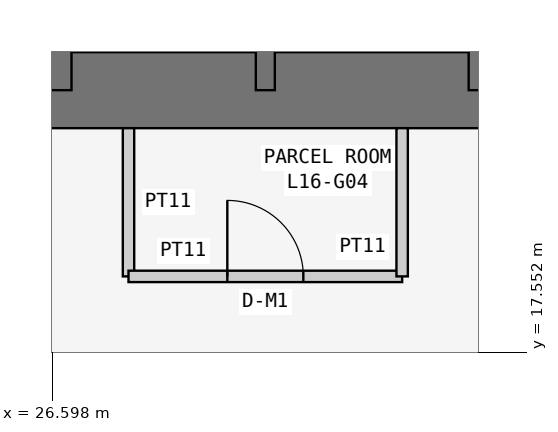
"""IFC4 building model, lengths in metres.
Left out: names, types, materials, properties, quantities, classifications, styles, units other than length and angle.
Written with IfcOpenShell. Run it as: python <this file> out.ifc"""

import sys

from ifc_helpers import new_model, si_unit, direction, frame, frame_2d, origin, place, context, subcontext, project, spatial, rectangle, extrude, element, fill, save


model = new_model("IFC4")
c1 = context("Model", 3, precision=1e-05, world=origin(), true_north=direction((0.0, 1.0)))
c2 = subcontext(c1, "Body", "Model", "MODEL_VIEW")
j1 = project(units=[si_unit("LENGTHUNIT", "METRE"), si_unit("PLANEANGLEUNIT", "RADIAN")], contexts=[c1])
p1 = place(None, origin())
s1 = spatial("IfcSite", under=j1, at=p1, CompositionType="ELEMENT")
p2 = place(p1, origin())
s2 = spatial("IfcBuilding", under=s1, at=p2, CompositionType="ELEMENT")
p3 = place(p2, frame((0.0, 0.0, 66.9)))
s3 = spatial("IfcBuildingStorey", under=s2, at=p3, CompositionType="ELEMENT", Elevation=66.9)
p4 = place(p3, frame((21.0, 21.0, 0.0), z_axis=(0.0, 0.0, 1.0), x_axis=(1.0, 0.0, 0.0)))
e1 = element("IfcWall", 1, at=p4, inside=s3, PredefinedType="SHEAR", context=c2, shape_type="SweptSolid", body=[
    extrude(rectangle(XDim=17.3, YDim=1.0, at=frame_2d((8.65, 0.0))), origin(), (0.0, 0.0, 1.0), 3.6),
])
p5 = place(p3, frame((26.6, 21.0, 0.0), z_axis=(0.0, 0.0, 1.0), x_axis=(0.0, 1.0, 0.0)))
e2 = element("IfcWall", 2, at=p5, inside=s3, PredefinedType="SHEAR", context=c2, shape_type="SweptSolid", body=[
    extrude(rectangle(XDim=16.8, YDim=0.5, at=frame_2d((8.4, 0.0))), origin(), (0.0, 0.0, 1.0), 3.6),
])
p6 = place(p5, frame((10.4, 0.0, 0.0)))
e3 = element("IfcOpeningElement", 3, at=p6, cuts=e2, PredefinedType="OPENING", context=c2, shape_type="SweptSolid", body=[
    extrude(rectangle(XDim=1.2, YDim=2.1, at=frame_2d((0.6, 1.05))), frame((0.0, 0.26, 0.0), z_axis=(0.0, -1.0, 0.0), x_axis=(1.0, 0.0, 0.0)), (0.0, 0.0, 1.0), 0.52),
])
for number, where, z_axis, x_axis in (
    (4, (29.4, 21.0, 0.0), (0.0, 0.0, 1.0), (0.0, 1.0, 0.0)),
    (5, (32.2, 21.0, 0.0), (0.0, 0.0, 1.0), (0.0, 1.0, 0.0)),
):
    element("IfcWall", number, at=place(p3, frame(where, z_axis=z_axis, x_axis=x_axis)), inside=s3, PredefinedType="SHEAR", context=c2, shape_type="SweptSolid", body=[
        extrude(rectangle(XDim=3.2, YDim=0.25, at=frame_2d((1.6, 0.0))), origin(), (0.0, 0.0, 1.0), 3.6),
    ])
p7 = place(p3, frame((27.6, 20.5, 0.0), z_axis=(0.0, 0.0, 1.0), x_axis=(0.0, -1.0, 0.0)))
e6 = element("IfcWall", 6, at=p7, inside=s3, PredefinedType="PARTITIONING", context=c2, shape_type="SweptSolid", body=[
    extrude(rectangle(XDim=1.95, YDim=0.15, at=frame_2d((0.975, 0.0))), origin(), (0.0, 0.0, 1.0), 3.45),
])
p8 = place(p3, frame((27.6, 18.55, 0.0), z_axis=(0.0, 0.0, 1.0), x_axis=(1.0, 0.0, 0.0)))
e7 = element("IfcWall", 7, at=p8, inside=s3, PredefinedType="PARTITIONING", context=c2, shape_type="SweptSolid", body=[
    extrude(rectangle(XDim=3.6, YDim=0.15, at=frame_2d((1.8, 0.0))), origin(), (0.0, 0.0, 1.0), 3.45),
])
p9 = place(p8, frame((1.3, 0.0, 0.0)))
e8 = element("IfcOpeningElement", 8, at=p9, cuts=e7, PredefinedType="OPENING", context=c2, shape_type="SweptSolid", body=[
    extrude(rectangle(XDim=1.0, YDim=2.1, at=frame_2d((0.5, 1.05))), frame((0.0, 0.085, 0.0), z_axis=(0.0, -1.0, 0.0), x_axis=(1.0, 0.0, 0.0)), (0.0, 0.0, 1.0), 0.17),
])
p10 = place(p3, frame((31.2, 18.55, 0.0), z_axis=(0.0, 0.0, 1.0), x_axis=(0.0, 1.0, 0.0)))
e9 = element("IfcWall", 9, at=p10, inside=s3, PredefinedType="PARTITIONING", context=c2, shape_type="SweptSolid", body=[
    extrude(rectangle(XDim=1.95, YDim=0.15, at=frame_2d((0.975, 0.0))), origin(), (0.0, 0.0, 1.0), 3.45),
])
p11 = place(p9, origin())
e10 = element("IfcDoor", 10, at=p11, inside=s3, OperationType="SINGLE_SWING_LEFT", PredefinedType="DOOR", context=c2, shape_type="SweptSolid", body=[
    extrude(rectangle(XDim=1.0, YDim=2.1, at=frame_2d((0.5, 1.05))), frame((0.0, 0.025, 0.0), z_axis=(0.0, -1.0, 0.0), x_axis=(1.0, 0.0, 0.0)), (0.0, 0.0, 1.0), 0.05),
])
fill(e8, e10)
save(model, sys.argv[1])
